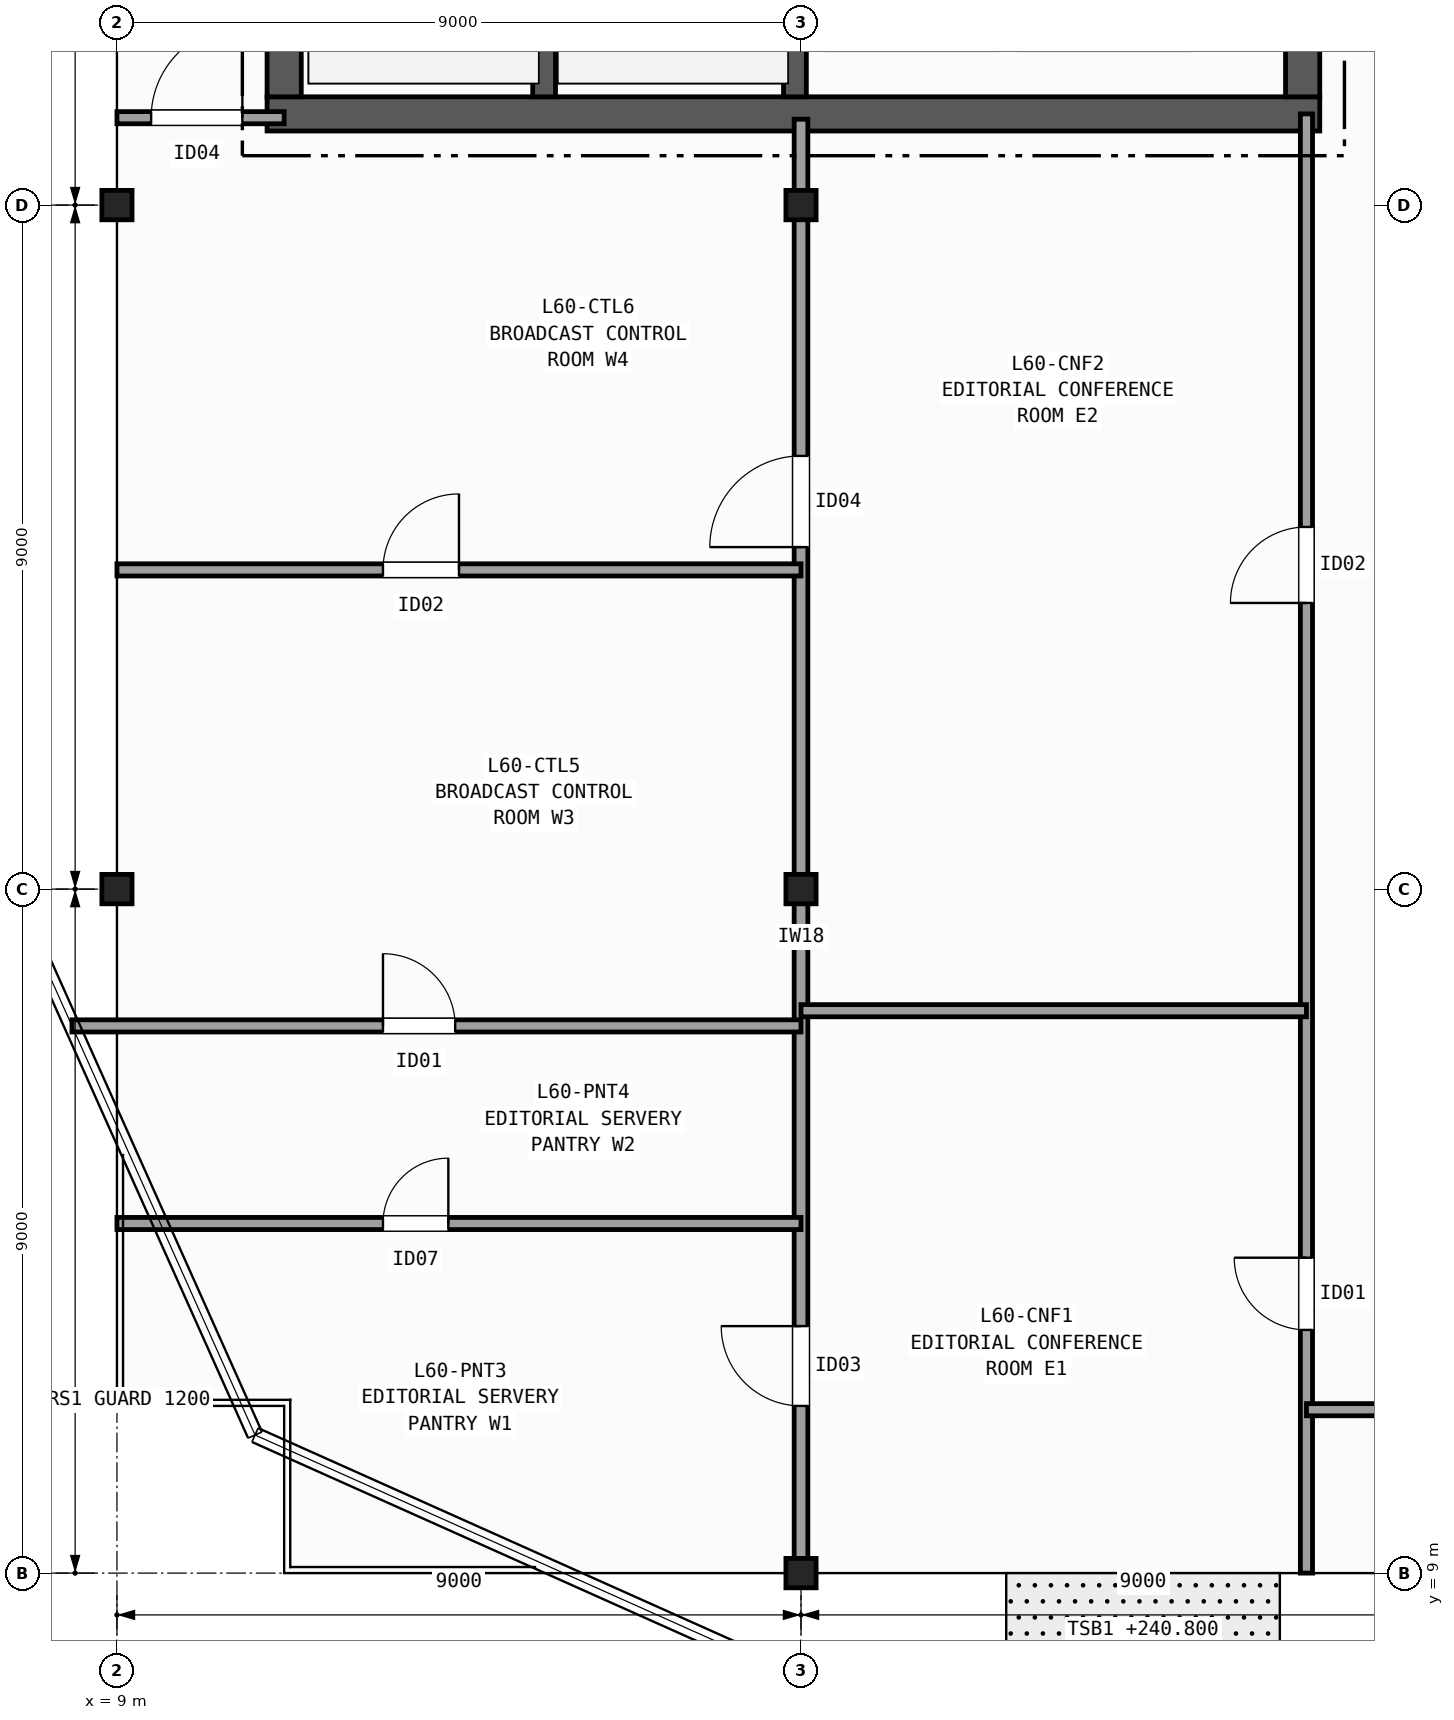
"""IFC4 building model, lengths in metres.
Left out: names, types, materials, properties, quantities, classifications, styles, units other than length and angle.
Written with IfcOpenShell. Run it as: python <this file> out.ifc"""

import sys

from ifc_helpers import new_model, si_unit, direction, frame, frame_2d, origin, origin_2d, place, context, subcontext, project, spatial, rectangle, i_section, extrude, element, fill, save


model = new_model("IFC4")
c1 = context("Model", 3, precision=1e-05, world=origin(), true_north=direction((0.0, 1.0)))
c2 = subcontext(c1, "Body", "Model", "MODEL_VIEW")
j1 = project(units=[si_unit("LENGTHUNIT", "METRE"), si_unit("PLANEANGLEUNIT", "RADIAN")], contexts=[c1])
p1 = place(None, origin())
s1 = spatial("IfcSite", under=j1, at=p1, CompositionType="ELEMENT")
p2 = place(p1, origin())
s2 = spatial("IfcBuilding", under=s1, at=p2, CompositionType="ELEMENT")
p3 = place(p2, frame((0.0, 0.0, 240.8)))
s3 = spatial("IfcBuildingStorey", under=s2, at=p3, CompositionType="ELEMENT", Elevation=240.8)
for number, where, z_axis, x_axis in (
    (1, (9.0, 18.0, 0.0), (0.0, 0.0, 1.0), (1.0, 0.0, 0.0)),
    (2, (9.0, 27.0, 0.0), (0.0, 0.0, 1.0), (1.0, 0.0, 0.0)),
    (3, (18.0, 9.0, 0.0), (0.0, 0.0, 1.0), (1.0, 0.0, 0.0)),
    (4, (18.0, 18.0, 0.0), (0.0, 0.0, 1.0), (1.0, 0.0, 0.0)),
    (5, (18.0, 27.0, 0.0), (0.0, 0.0, 1.0), (1.0, 0.0, 0.0)),
):
    element("IfcColumn", number, at=place(p3, frame(where, z_axis=z_axis, x_axis=x_axis)), inside=s3, PredefinedType="COLUMN", context=c2, shape_type="SweptSolid", body=[
        extrude(i_section(OverallWidth=0.397, OverallDepth=0.387, WebThickness=0.021, FlangeThickness=0.033, FilletRadius=0.015, at=origin_2d()), origin(), (0.0, 0.0, 1.0), 3.7),
    ])
p4 = place(p3, frame((10.975, 28.2, 0.0), z_axis=(0.0, 0.0, 1.0), x_axis=(1.0, 0.0, 0.0)))
e6 = element("IfcWall", 6, at=p4, inside=s3, PredefinedType="SHEAR", context=c2, shape_type="SweptSolid", body=[
    extrude(rectangle(XDim=13.85, YDim=0.45, at=frame_2d((6.925, 0.0))), origin(), (0.0, 0.0, 1.0), 3.42),
])
p5 = place(p3, frame((11.2, 42.175, 0.0), z_axis=(0.0, 0.0, 1.0), x_axis=(0.0, -1.0, 0.0)))
e7 = element("IfcWall", 7, at=p5, inside=s3, PredefinedType="SHEAR", context=c2, shape_type="SweptSolid", body=[
    extrude(rectangle(XDim=13.75, YDim=0.45, at=frame_2d((6.875, 0.0))), origin(), (0.0, 0.0, 1.0), 3.42),
])
p6 = place(p3, frame((24.6, 28.425, 0.0), z_axis=(0.0, 0.0, 1.0), x_axis=(0.0, 1.0, 0.0)))
e8 = element("IfcWall", 8, at=p6, inside=s3, PredefinedType="SHEAR", context=c2, shape_type="SweptSolid", body=[
    extrude(rectangle(XDim=13.75, YDim=0.45, at=frame_2d((6.875, 0.0))), origin(), (0.0, 0.0, 1.0), 3.42),
])
p7 = place(p6, frame((3.375, 0.0, 0.0)))
e9 = element("IfcOpeningElement", 9, at=p7, cuts=e8, PredefinedType="OPENING", context=c2, shape_type="SweptSolid", body=[
    extrude(rectangle(XDim=1.5, YDim=2.2, at=frame_2d((0.75, 1.1))), frame((0.0, 0.235, 0.0), z_axis=(0.0, -1.0, 0.0), x_axis=(1.0, 0.0, 0.0)), (0.0, 0.0, 1.0), 0.47),
])
p8 = place(p6, frame((9.975, 0.0, 0.0)))
e10 = element("IfcOpeningElement", 10, at=p8, cuts=e8, PredefinedType="OPENING", context=c2, shape_type="SweptSolid", body=[
    extrude(rectangle(XDim=0.9, YDim=2.1, at=frame_2d((0.45, 1.05))), frame((0.0, 0.235, 0.0), z_axis=(0.0, -1.0, 0.0), x_axis=(1.0, 0.0, 0.0)), (0.0, 0.0, 1.0), 0.47),
])
p9 = place(p3, frame((14.62, 28.425, 0.0), z_axis=(0.0, 0.0, 1.0), x_axis=(0.0, 1.0, 0.0)))
e11 = element("IfcWall", 11, at=p9, inside=s3, PredefinedType="SHEAR", context=c2, shape_type="SweptSolid", body=[
    extrude(rectangle(XDim=9.025, YDim=0.3, at=frame_2d((4.512, 0.0))), origin(), (0.0, 0.0, 1.0), 3.42),
])
p10 = place(p3, frame((17.92, 42.175, 0.0), z_axis=(0.0, 0.0, 1.0), x_axis=(0.0, -1.0, 0.0)))
e12 = element("IfcWall", 12, at=p10, inside=s3, PredefinedType="SHEAR", context=c2, shape_type="SweptSolid", body=[
    extrude(rectangle(XDim=13.75, YDim=0.3, at=frame_2d((6.875, 0.0))), origin(), (0.0, 0.0, 1.0), 3.42),
])
p11 = place(p10, frame((2.0, 0.0, 0.0)))
e13 = element("IfcOpeningElement", 13, at=p11, cuts=e12, PredefinedType="OPENING", context=c2, shape_type="SweptSolid", body=[
    extrude(rectangle(XDim=1.15, YDim=2.15, at=frame_2d((0.575, 1.075))), frame((0.0, 0.16, 0.0), z_axis=(0.0, -1.0, 0.0), x_axis=(1.0, 0.0, 0.0)), (0.0, 0.0, 1.0), 0.32),
])
p12 = place(p3, frame((9.0, 28.15, 0.0), z_axis=(0.0, 0.0, 1.0), x_axis=(1.0, 0.0, 0.0)))
e14 = element("IfcWall", 14, at=p12, inside=s3, PredefinedType="PARTITIONING", context=c2, shape_type="SweptSolid", body=[
    extrude(rectangle(XDim=2.2, YDim=0.16, at=frame_2d((1.1, 0.0))), origin(), (0.0, 0.0, 1.0), 2.707),
])
p13 = place(p12, frame((0.45, 0.0, 0.0)))
e15 = element("IfcOpeningElement", 15, at=p13, cuts=e14, PredefinedType="OPENING", context=c2, shape_type="SweptSolid", body=[
    extrude(rectangle(XDim=1.2, YDim=2.15, at=frame_2d((0.6, 1.075))), frame((0.0, 0.09, 0.0), z_axis=(0.0, -1.0, 0.0), x_axis=(1.0, 0.0, 0.0)), (0.0, 0.0, 1.0), 0.18),
])
p14 = place(p3, frame((24.65, 9.0, 0.0), z_axis=(0.0, 0.0, 1.0), x_axis=(0.0, 1.0, 0.0)))
e16 = element("IfcWall", 16, at=p14, inside=s3, PredefinedType="PARTITIONING", context=c2, shape_type="SweptSolid", body=[
    extrude(rectangle(XDim=19.2, YDim=0.16, at=frame_2d((9.6, 0.0))), origin(), (0.0, 0.0, 1.0), 2.707),
])
p15 = place(p14, frame((3.2, 0.0, 0.0)))
e17 = element("IfcOpeningElement", 17, at=p15, cuts=e16, PredefinedType="OPENING", context=c2, shape_type="SweptSolid", body=[
    extrude(rectangle(XDim=0.95, YDim=2.1, at=frame_2d((0.475, 1.05))), frame((0.0, 0.09, 0.0), z_axis=(0.0, -1.0, 0.0), x_axis=(1.0, 0.0, 0.0)), (0.0, 0.0, 1.0), 0.18),
])
p16 = place(p14, frame((12.765, 0.0, 0.0)))
e18 = element("IfcOpeningElement", 18, at=p16, cuts=e16, PredefinedType="OPENING", context=c2, shape_type="SweptSolid", body=[
    extrude(rectangle(XDim=1.0, YDim=2.1, at=frame_2d((0.5, 1.05))), frame((0.0, 0.09, 0.0), z_axis=(0.0, -1.0, 0.0), x_axis=(1.0, 0.0, 0.0)), (0.0, 0.0, 1.0), 0.18),
])
p17 = place(p3, frame((18.0, 9.0, 0.0), z_axis=(0.0, 0.0, 1.0), x_axis=(0.0, 1.0, 0.0)))
e19 = element("IfcWall", 19, at=p17, inside=s3, PredefinedType="PARTITIONING", context=c2, shape_type="SweptSolid", body=[
    extrude(rectangle(XDim=19.13, YDim=0.18, at=frame_2d((9.565, 0.0))), origin(), (0.0, 0.0, 1.0), 2.707),
])
p18 = place(p17, frame((2.2, 0.0, 0.0)))
e20 = element("IfcOpeningElement", 20, at=p18, cuts=e19, PredefinedType="OPENING", context=c2, shape_type="SweptSolid", body=[
    extrude(rectangle(XDim=1.05, YDim=2.15, at=frame_2d((0.525, 1.075))), frame((0.0, 0.1, 0.0), z_axis=(0.0, -1.0, 0.0), x_axis=(1.0, 0.0, 0.0)), (0.0, 0.0, 1.0), 0.2),
])
p19 = place(p17, frame((13.5, 0.0, 0.0)))
e21 = element("IfcOpeningElement", 21, at=p19, cuts=e19, PredefinedType="OPENING", context=c2, shape_type="SweptSolid", body=[
    extrude(rectangle(XDim=1.2, YDim=2.15, at=frame_2d((0.6, 1.075))), frame((0.0, 0.1, 0.0), z_axis=(0.0, -1.0, 0.0), x_axis=(1.0, 0.0, 0.0)), (0.0, 0.0, 1.0), 0.2),
])
p20 = place(p3, frame((18.0, 16.4, 0.0), z_axis=(0.0, 0.0, 1.0), x_axis=(1.0, 0.0, 0.0)))
e22 = element("IfcWall", 22, at=p20, inside=s3, PredefinedType="PARTITIONING", context=c2, shape_type="SweptSolid", body=[
    extrude(rectangle(XDim=6.65, YDim=0.16, at=frame_2d((3.325, 0.0))), origin(), (0.0, 0.0, 1.0), 2.789),
])
p21 = place(p3, frame((9.0, 13.6, 0.0), z_axis=(0.0, 0.0, 1.0), x_axis=(1.0, 0.0, 0.0)))
e23 = element("IfcWall", 23, at=p21, inside=s3, PredefinedType="PARTITIONING", context=c2, shape_type="SweptSolid", body=[
    extrude(rectangle(XDim=9.0, YDim=0.16, at=frame_2d((4.5, 0.0))), origin(), (0.0, 0.0, 1.0), 2.792),
])
p22 = place(p21, frame((3.5, 0.0, 0.0)))
e24 = element("IfcOpeningElement", 24, at=p22, cuts=e23, PredefinedType="OPENING", context=c2, shape_type="SweptSolid", body=[
    extrude(rectangle(XDim=0.86, YDim=2.05, at=frame_2d((0.43, 1.025))), frame((0.0, 0.09, 0.0), z_axis=(0.0, -1.0, 0.0), x_axis=(1.0, 0.0, 0.0)), (0.0, 0.0, 1.0), 0.18),
])
p23 = place(p3, frame((8.408, 16.2, 0.0), z_axis=(0.0, 0.0, 1.0), x_axis=(1.0, 0.0, 0.0)))
e25 = element("IfcWall", 25, at=p23, inside=s3, PredefinedType="PARTITIONING", context=c2, shape_type="SweptSolid", body=[
    extrude(rectangle(XDim=9.592, YDim=0.16, at=frame_2d((4.796, 0.0))), origin(), (0.0, 0.0, 1.0), 2.792),
])
p24 = place(p23, frame((4.092, 0.0, 0.0)))
e26 = element("IfcOpeningElement", 26, at=p24, cuts=e25, PredefinedType="OPENING", context=c2, shape_type="SweptSolid", body=[
    extrude(rectangle(XDim=0.95, YDim=2.1, at=frame_2d((0.475, 1.05))), frame((0.0, 0.09, 0.0), z_axis=(0.0, -1.0, 0.0), x_axis=(1.0, 0.0, 0.0)), (0.0, 0.0, 1.0), 0.18),
])
p25 = place(p3, frame((9.0, 22.2, 0.0), z_axis=(0.0, 0.0, 1.0), x_axis=(1.0, 0.0, 0.0)))
e27 = element("IfcWall", 27, at=p25, inside=s3, PredefinedType="PARTITIONING", context=c2, shape_type="SweptSolid", body=[
    extrude(rectangle(XDim=9.0, YDim=0.16, at=frame_2d((4.5, 0.0))), origin(), (0.0, 0.0, 1.0), 2.707),
])
p26 = place(p25, frame((3.5, 0.0, 0.0)))
e28 = element("IfcOpeningElement", 28, at=p26, cuts=e27, PredefinedType="OPENING", context=c2, shape_type="SweptSolid", body=[
    extrude(rectangle(XDim=1.0, YDim=2.1, at=frame_2d((0.5, 1.05))), frame((0.0, 0.09, 0.0), z_axis=(0.0, -1.0, 0.0), x_axis=(1.0, 0.0, 0.0)), (0.0, 0.0, 1.0), 0.18),
])
p27 = place(p3, frame((24.65, 11.15, 0.0), z_axis=(0.0, 0.0, 1.0), x_axis=(1.0, 0.0, 0.0)))
e29 = element("IfcWall", 29, at=p27, inside=s3, PredefinedType="PARTITIONING", context=c2, shape_type="SweptSolid", body=[
    extrude(rectangle(XDim=4.75, YDim=0.16, at=frame_2d((2.375, 0.0))), origin(), (0.0, 0.0, 1.0), 2.792),
])
p28 = place(p27, frame((1.2, 0.0, 0.0)))
e30 = element("IfcOpeningElement", 30, at=p28, cuts=e29, PredefinedType="OPENING", context=c2, shape_type="SweptSolid", body=[
    extrude(rectangle(XDim=1.05, YDim=2.15, at=frame_2d((0.525, 1.075))), frame((0.0, 0.09, 0.0), z_axis=(0.0, -1.0, 0.0), x_axis=(1.0, 0.0, 0.0)), (0.0, 0.0, 1.0), 0.18),
])
p29 = place(p13, origin())
e31 = element("IfcDoor", 31, at=p29, inside=s3, OperationType="SINGLE_SWING_RIGHT", PredefinedType="DOOR", context=c2, shape_type="SweptSolid", body=[
    extrude(rectangle(XDim=1.2, YDim=2.15, at=frame_2d((0.6, 1.075))), frame((0.0, 0.025, 0.0), z_axis=(0.0, -1.0, 0.0), x_axis=(1.0, 0.0, 0.0)), (0.0, 0.0, 1.0), 0.05),
])
fill(e15, e31)
p30 = place(p15, origin())
e32 = element("IfcDoor", 32, at=p30, inside=s3, OperationType="SINGLE_SWING_RIGHT", PredefinedType="DOOR", context=c2, shape_type="SweptSolid", body=[
    extrude(rectangle(XDim=0.95, YDim=2.1, at=frame_2d((0.475, 1.05))), frame((0.0, 0.025, 0.0), z_axis=(0.0, -1.0, 0.0), x_axis=(1.0, 0.0, 0.0)), (0.0, 0.0, 1.0), 0.05),
])
fill(e17, e32)
p31 = place(p16, origin())
e33 = element("IfcDoor", 33, at=p31, inside=s3, OperationType="SINGLE_SWING_LEFT", PredefinedType="DOOR", context=c2, shape_type="SweptSolid", body=[
    extrude(rectangle(XDim=1.0, YDim=2.1, at=frame_2d((0.5, 1.05))), frame((0.0, 0.025, 0.0), z_axis=(0.0, -1.0, 0.0), x_axis=(1.0, 0.0, 0.0)), (0.0, 0.0, 1.0), 0.05),
])
fill(e18, e33)
p32 = place(p18, origin())
e34 = element("IfcDoor", 34, at=p32, inside=s3, OperationType="SINGLE_SWING_RIGHT", PredefinedType="DOOR", context=c2, shape_type="SweptSolid", body=[
    extrude(rectangle(XDim=1.05, YDim=2.15, at=frame_2d((0.525, 1.075))), frame((0.0, 0.025, 0.0), z_axis=(0.0, -1.0, 0.0), x_axis=(1.0, 0.0, 0.0)), (0.0, 0.0, 1.0), 0.05),
])
fill(e20, e34)
p33 = place(p19, origin())
e35 = element("IfcDoor", 35, at=p33, inside=s3, OperationType="SINGLE_SWING_LEFT", PredefinedType="DOOR", context=c2, shape_type="SweptSolid", body=[
    extrude(rectangle(XDim=1.2, YDim=2.15, at=frame_2d((0.6, 1.075))), frame((0.0, 0.025, 0.0), z_axis=(0.0, -1.0, 0.0), x_axis=(1.0, 0.0, 0.0)), (0.0, 0.0, 1.0), 0.05),
])
fill(e21, e35)
p34 = place(p22, origin())
e36 = element("IfcDoor", 36, at=p34, inside=s3, OperationType="SINGLE_SWING_RIGHT", PredefinedType="DOOR", context=c2, shape_type="SweptSolid", body=[
    extrude(rectangle(XDim=0.86, YDim=2.05, at=frame_2d((0.43, 1.025))), frame((0.0, 0.025, 0.0), z_axis=(0.0, -1.0, 0.0), x_axis=(1.0, 0.0, 0.0)), (0.0, 0.0, 1.0), 0.05),
])
fill(e24, e36)
p35 = place(p24, origin())
e37 = element("IfcDoor", 37, at=p35, inside=s3, OperationType="SINGLE_SWING_LEFT", PredefinedType="DOOR", context=c2, shape_type="SweptSolid", body=[
    extrude(rectangle(XDim=0.95, YDim=2.1, at=frame_2d((0.475, 1.05))), frame((0.0, 0.025, 0.0), z_axis=(0.0, -1.0, 0.0), x_axis=(1.0, 0.0, 0.0)), (0.0, 0.0, 1.0), 0.05),
])
fill(e26, e37)
p36 = place(p26, origin())
e38 = element("IfcDoor", 38, at=p36, inside=s3, OperationType="SINGLE_SWING_RIGHT", PredefinedType="DOOR", context=c2, shape_type="SweptSolid", body=[
    extrude(rectangle(XDim=1.0, YDim=2.1, at=frame_2d((0.5, 1.05))), frame((0.0, 0.025, 0.0), z_axis=(0.0, -1.0, 0.0), x_axis=(1.0, 0.0, 0.0)), (0.0, 0.0, 1.0), 0.05),
])
fill(e28, e38)
save(model, sys.argv[1])
